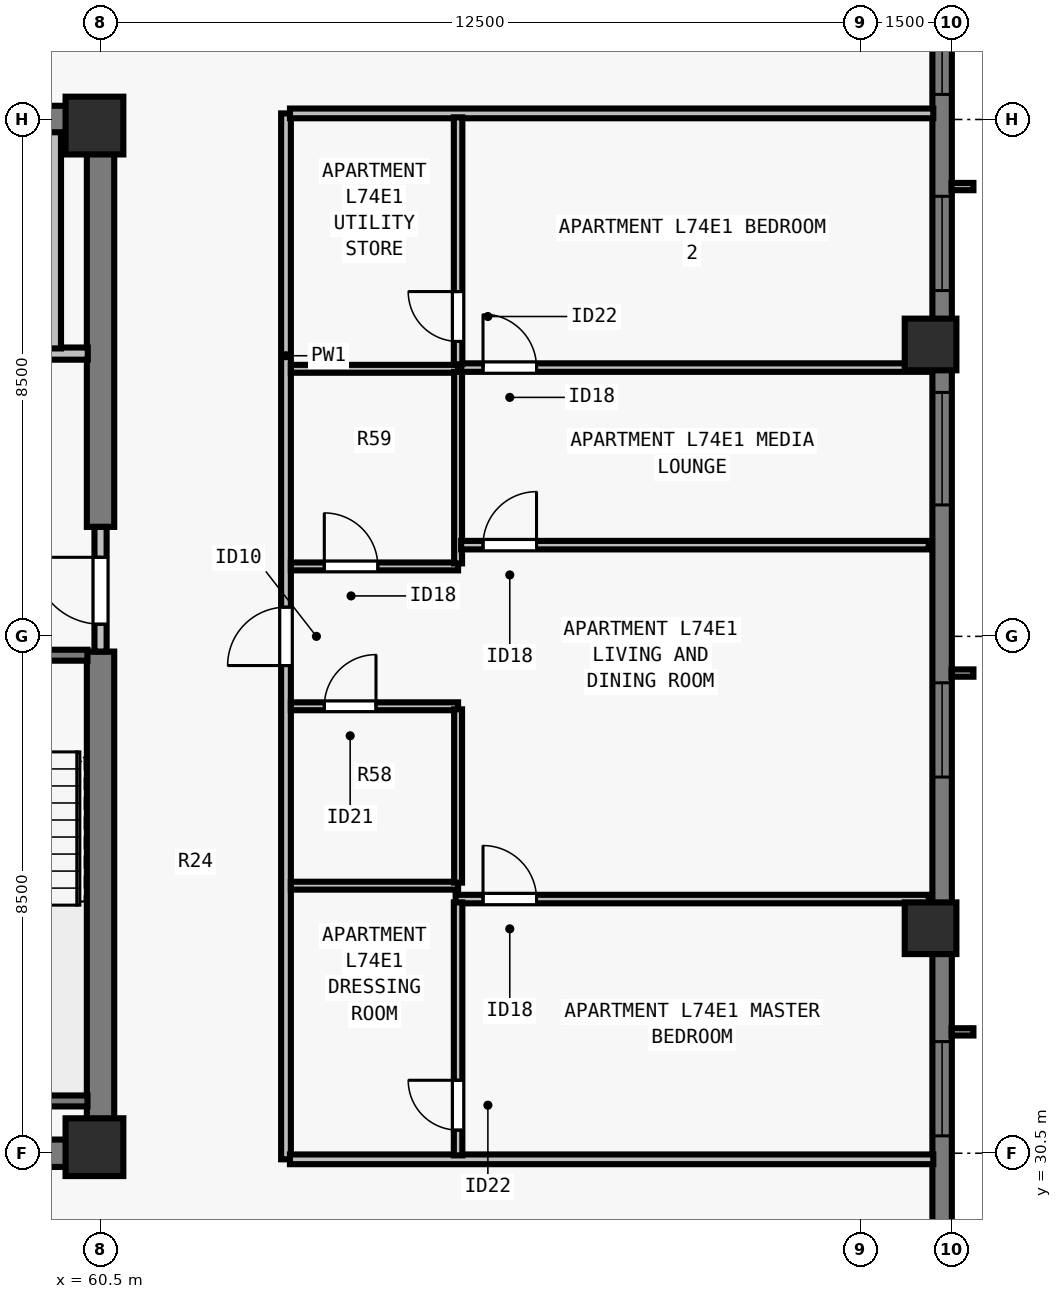
"""IFC4 building model, lengths in metres.
Left out: names, types, materials, properties, quantities, classifications, styles, units other than length and angle.
Written with IfcOpenShell. Run it as: python <this file> out.ifc"""

import sys

from ifc_helpers import new_model, si_unit, direction, frame, frame_2d, origin, origin_2d, place, context, subcontext, project, spatial, rectangle, extrude, element, fill, save


model = new_model("IFC4")
c1 = context("Model", 3, precision=1e-05, world=origin(), true_north=direction((0.0, 1.0)))
c2 = subcontext(c1, "Body", "Model", "MODEL_VIEW")
j1 = project(units=[si_unit("LENGTHUNIT", "METRE"), si_unit("PLANEANGLEUNIT", "RADIAN")], contexts=[c1])
p1 = place(None, origin())
s1 = spatial("IfcSite", under=j1, at=p1, CompositionType="ELEMENT")
p2 = place(p1, origin())
s2 = spatial("IfcBuilding", under=s1, at=p2, CompositionType="ELEMENT")
p3 = place(p2, frame((0.0, 0.0, 269.0)))
s3 = spatial("IfcBuildingStorey", under=s2, at=p3, CompositionType="ELEMENT", Elevation=269.0)
for number, where, z_axis, x_axis in (
    (1, (60.4, 30.6, 0.0), (0.0, 0.0, 1.0), (1.0, 0.0, 0.0)),
    (2, (60.4, 47.4, 0.0), (0.0, 0.0, 1.0), (1.0, 0.0, 0.0)),
):
    element("IfcColumn", number, at=place(p3, frame(where, z_axis=z_axis, x_axis=x_axis)), inside=s3, PredefinedType="COLUMN", context=c2, shape_type="SweptSolid", body=[
        extrude(rectangle(XDim=0.95, YDim=0.95, at=origin_2d()), origin(), (0.0, 0.0, 1.0), 3.5),
    ])
for number, where, z_axis, x_axis in (
    (3, (74.15, 34.2, 0.0), (0.0, 0.0, 1.0), (0.0, 1.0, 0.0)),
    (4, (74.15, 43.8, 0.0), (0.0, 0.0, 1.0), (0.0, 1.0, 0.0)),
):
    element("IfcColumn", number, at=place(p3, frame(where, z_axis=z_axis, x_axis=x_axis)), inside=s3, PredefinedType="COLUMN", context=c2, shape_type="SweptSolid", body=[
        extrude(rectangle(XDim=0.85, YDim=0.85, at=origin_2d()), origin(), (0.0, 0.0, 1.0), 3.5),
    ])
p4 = place(p3, frame((74.34, 56.5, 0.0), z_axis=(0.0, 0.0, 1.0), x_axis=(0.0, -1.0, 0.0)))
e5 = element("IfcWall", 5, at=p4, inside=s3, PredefinedType="SOLIDWALL", context=c2, shape_type="SweptSolid", body=[
    extrude(rectangle(XDim=34.702, YDim=0.32, at=frame_2d((17.351, 0.0))), origin(), (0.0, 0.0, 1.0), 3.29),
])
p5 = place(p4, frame((6.738, 0.0, 0.8)))
e6 = element("IfcOpeningElement", 6, at=p5, cuts=e5, PredefinedType="OPENING", context=c2, shape_type="SweptSolid", body=[
    extrude(rectangle(XDim=1.85, YDim=1.678, at=frame_2d((0.925, 0.839))), frame((0.0, 0.17, 0.0), z_axis=(0.0, -1.0, 0.0), x_axis=(1.0, 0.0, 0.0)), (0.0, 0.0, 1.0), 0.34),
])
p6 = place(p4, frame((10.263, 0.0, 0.8)))
e7 = element("IfcOpeningElement", 7, at=p6, cuts=e5, PredefinedType="OPENING", context=c2, shape_type="SweptSolid", body=[
    extrude(rectangle(XDim=1.55, YDim=1.678, at=frame_2d((0.775, 0.839))), frame((0.0, 0.17, 0.0), z_axis=(0.0, -1.0, 0.0), x_axis=(1.0, 0.0, 0.0)), (0.0, 0.0, 1.0), 0.34),
])
p7 = place(p4, frame((13.488, 0.0, 0.8)))
e8 = element("IfcOpeningElement", 8, at=p7, cuts=e5, PredefinedType="OPENING", context=c2, shape_type="SweptSolid", body=[
    extrude(rectangle(XDim=1.85, YDim=1.678, at=frame_2d((0.925, 0.839))), frame((0.0, 0.17, 0.0), z_axis=(0.0, -1.0, 0.0), x_axis=(1.0, 0.0, 0.0)), (0.0, 0.0, 1.0), 0.34),
])
p8 = place(p4, frame((18.264, 0.0, 0.8)))
e9 = element("IfcOpeningElement", 9, at=p8, cuts=e5, PredefinedType="OPENING", context=c2, shape_type="SweptSolid", body=[
    extrude(rectangle(XDim=1.55, YDim=1.678, at=frame_2d((0.775, 0.839))), frame((0.0, 0.17, 0.0), z_axis=(0.0, -1.0, 0.0), x_axis=(1.0, 0.0, 0.0)), (0.0, 0.0, 1.0), 0.34),
])
p9 = place(p4, frame((24.164, 0.0, 0.8)))
e10 = element("IfcOpeningElement", 10, at=p9, cuts=e5, PredefinedType="OPENING", context=c2, shape_type="SweptSolid", body=[
    extrude(rectangle(XDim=1.55, YDim=1.678, at=frame_2d((0.775, 0.839))), frame((0.0, 0.17, 0.0), z_axis=(0.0, -1.0, 0.0), x_axis=(1.0, 0.0, 0.0)), (0.0, 0.0, 1.0), 0.34),
])
for number, where, z_axis, x_axis in (
    (11, (43.275, 30.5, 0.0), (0.0, 0.0, 1.0), (1.0, 0.0, 0.0)),
    (12, (43.275, 47.5, 0.0), (0.0, 0.0, 1.0), (1.0, 0.0, 0.0)),
):
    element("IfcWall", number, at=place(p3, frame(where, z_axis=z_axis, x_axis=x_axis)), inside=s3, PredefinedType="SHEAR", context=c2, shape_type="SweptSolid", body=[
        extrude(rectangle(XDim=17.45, YDim=0.45, at=frame_2d((8.725, 0.0))), origin(), (0.0, 0.0, 1.0), 3.29),
    ])
p10 = place(p3, frame((60.5, 30.715, 0.0), z_axis=(0.0, 0.0, 1.0), x_axis=(0.0, 1.0, 0.0)))
e13 = element("IfcWall", 13, at=p10, inside=s3, PredefinedType="SHEAR", context=c2, shape_type="SweptSolid", body=[
    extrude(rectangle(XDim=8.035, YDim=0.45, at=frame_2d((4.018, 0.0))), origin(), (0.0, 0.0, 1.0), 3.29),
])
p11 = place(p3, frame((60.5, 40.8, 0.0), z_axis=(0.0, 0.0, 1.0), x_axis=(0.0, 1.0, 0.0)))
e14 = element("IfcWall", 14, at=p11, inside=s3, PredefinedType="SHEAR", context=c2, shape_type="SweptSolid", body=[
    extrude(rectangle(XDim=6.485, YDim=0.45, at=frame_2d((3.242, 0.0))), origin(), (0.0, 0.0, 1.0), 3.29),
])
p12 = place(p3, frame((60.5, 38.75, 0.0), z_axis=(0.0, 0.0, 1.0), x_axis=(0.0, 1.0, 0.0)))
e15 = element("IfcWall", 15, at=p12, inside=s3, PredefinedType="SOLIDWALL", context=c2, shape_type="SweptSolid", body=[
    extrude(rectangle(XDim=2.05, YDim=0.2, at=frame_2d((1.025, 0.0))), origin(), (0.0, 0.0, 1.0), 3.29),
])
p13 = place(p12, frame((0.45, 0.0, 0.0)))
e16 = element("IfcOpeningElement", 16, at=p13, cuts=e15, PredefinedType="OPENING", context=c2, shape_type="SweptSolid", body=[
    extrude(rectangle(XDim=1.1, YDim=2.15, at=frame_2d((0.55, 1.075))), frame((0.0, 0.11, 0.0), z_axis=(0.0, -1.0, 0.0), x_axis=(1.0, 0.0, 0.0)), (0.0, 0.0, 1.0), 0.22),
])
p14 = place(p3, frame((56.735, 43.65, 0.0), z_axis=(0.0, 0.0, 1.0), x_axis=(1.0, 0.0, 0.0)))
e17 = element("IfcWall", 17, at=p14, inside=s3, PredefinedType="SOLIDWALL", context=c2, shape_type="SweptSolid", body=[
    extrude(rectangle(XDim=3.555, YDim=0.2, at=frame_2d((1.777, 0.0))), origin(), (0.0, 0.0, 1.0), 3.29),
])
p15 = place(p14, frame((1.295, 0.0, 0.0)))
e18 = element("IfcOpeningElement", 18, at=p15, cuts=e17, PredefinedType="OPENING", context=c2, shape_type="SweptSolid", body=[
    extrude(rectangle(XDim=1.1, YDim=2.2, at=frame_2d((0.55, 1.1))), frame((0.0, 0.11, 0.0), z_axis=(0.0, -1.0, 0.0), x_axis=(1.0, 0.0, 0.0)), (0.0, 0.0, 1.0), 0.22),
])
p16 = place(p3, frame((59.75, 43.735, 0.0), z_axis=(0.0, 0.0, 1.0), x_axis=(0.0, 1.0, 0.0)))
e19 = element("IfcWall", 19, at=p16, inside=s3, PredefinedType="SOLIDWALL", context=c2, shape_type="SweptSolid", body=[
    extrude(rectangle(XDim=3.555, YDim=0.2, at=frame_2d((1.777, 0.0))), origin(), (0.0, 0.0, 1.0), 3.29),
])
p17 = place(p3, frame((63.55, 30.4, 0.0), z_axis=(0.0, 0.0, 1.0), x_axis=(0.0, 1.0, 0.0)))
e20 = element("IfcWall", 20, at=p17, inside=s3, PredefinedType="PARTITIONING", context=c2, shape_type="SweptSolid", body=[
    extrude(rectangle(XDim=17.2, YDim=0.16, at=frame_2d((8.6, 0.0))), origin(), (0.0, 0.0, 1.0), 3.29),
])
p18 = place(p17, frame((8.12, 0.0, 0.0)))
e21 = element("IfcOpeningElement", 21, at=p18, cuts=e20, PredefinedType="OPENING", context=c2, shape_type="SweptSolid", body=[
    extrude(rectangle(XDim=0.96, YDim=2.18, at=frame_2d((0.48, 1.09))), frame((0.0, 0.09, 0.0), z_axis=(0.0, -1.0, 0.0), x_axis=(1.0, 0.0, 0.0)), (0.0, 0.0, 1.0), 0.18),
])
for number, where, z_axis, x_axis in (
    (22, (63.615, 30.4, 0.0), (0.0, 0.0, 1.0), (1.0, 0.0, 0.0)),
    (23, (63.615, 47.6, 0.0), (0.0, 0.0, 1.0), (1.0, 0.0, 0.0)),
):
    element("IfcWall", number, at=place(p3, frame(where, z_axis=z_axis, x_axis=x_axis)), inside=s3, PredefinedType="PARTITIONING", context=c2, shape_type="SweptSolid", body=[
        extrude(rectangle(XDim=10.58, YDim=0.16, at=frame_2d((5.29, 0.0))), origin(), (0.0, 0.0, 1.0), 3.29),
    ])
p19 = place(p3, frame((63.63, 34.9, 0.0), z_axis=(0.0, 0.0, 1.0), x_axis=(1.0, 0.0, 0.0)))
e24 = element("IfcWall", 24, at=p19, inside=s3, PredefinedType="PLUMBINGWALL", context=c2, shape_type="SweptSolid", body=[
    extrude(rectangle(XDim=2.75, YDim=0.13, at=frame_2d((1.375, 0.0))), origin(), (0.0, 0.0, 1.0), 3.29),
])
p20 = place(p3, frame((63.63, 37.85, 0.0), z_axis=(0.0, 0.0, 1.0), x_axis=(1.0, 0.0, 0.0)))
e25 = element("IfcWall", 25, at=p20, inside=s3, PredefinedType="PLUMBINGWALL", context=c2, shape_type="SweptSolid", body=[
    extrude(rectangle(XDim=2.75, YDim=0.13, at=frame_2d((1.375, 0.0))), origin(), (0.0, 0.0, 1.0), 3.29),
])
p21 = place(p20, frame((0.55, 0.0, 0.0)))
e26 = element("IfcOpeningElement", 26, at=p21, cuts=e25, PredefinedType="OPENING", context=c2, shape_type="SweptSolid", body=[
    extrude(rectangle(XDim=0.85, YDim=2.08, at=frame_2d((0.425, 1.04))), frame((0.0, 0.075, 0.0), z_axis=(0.0, -1.0, 0.0), x_axis=(1.0, 0.0, 0.0)), (0.0, 0.0, 1.0), 0.15),
])
p22 = place(p3, frame((66.38, 34.95, 0.0), z_axis=(0.0, 0.0, 1.0), x_axis=(0.0, 1.0, 0.0)))
e27 = element("IfcWall", 27, at=p22, inside=s3, PredefinedType="PLUMBINGWALL", context=c2, shape_type="SweptSolid", body=[
    extrude(rectangle(XDim=2.85, YDim=0.13, at=frame_2d((1.425, 0.0))), origin(), (0.0, 0.0, 1.0), 3.29),
])
p23 = place(p3, frame((63.63, 43.4, 0.0), z_axis=(0.0, 0.0, 1.0), x_axis=(1.0, 0.0, 0.0)))
e28 = element("IfcWall", 28, at=p23, inside=s3, PredefinedType="PLUMBINGWALL", context=c2, shape_type="SweptSolid", body=[
    extrude(rectangle(XDim=2.75, YDim=0.13, at=frame_2d((1.375, 0.0))), origin(), (0.0, 0.0, 1.0), 3.29),
])
p24 = place(p3, frame((63.63, 40.15, 0.0), z_axis=(0.0, 0.0, 1.0), x_axis=(1.0, 0.0, 0.0)))
e29 = element("IfcWall", 29, at=p24, inside=s3, PredefinedType="PLUMBINGWALL", context=c2, shape_type="SweptSolid", body=[
    extrude(rectangle(XDim=2.75, YDim=0.13, at=frame_2d((1.375, 0.0))), origin(), (0.0, 0.0, 1.0), 3.29),
])
p25 = place(p24, frame((0.55, 0.0, 0.0)))
e30 = element("IfcOpeningElement", 30, at=p25, cuts=e29, PredefinedType="OPENING", context=c2, shape_type="SweptSolid", body=[
    extrude(rectangle(XDim=0.88, YDim=2.1, at=frame_2d((0.44, 1.05))), frame((0.0, 0.075, 0.0), z_axis=(0.0, -1.0, 0.0), x_axis=(1.0, 0.0, 0.0)), (0.0, 0.0, 1.0), 0.15),
])
p26 = place(p3, frame((66.38, 40.2, 0.0), z_axis=(0.0, 0.0, 1.0), x_axis=(0.0, 1.0, 0.0)))
e31 = element("IfcWall", 31, at=p26, inside=s3, PredefinedType="PLUMBINGWALL", context=c2, shape_type="SweptSolid", body=[
    extrude(rectangle(XDim=3.15, YDim=0.13, at=frame_2d((1.575, 0.0))), origin(), (0.0, 0.0, 1.0), 3.29),
])
p27 = place(p3, frame((66.34, 34.68, 0.0), z_axis=(0.0, 0.0, 1.0), x_axis=(1.0, 0.0, 0.0)))
e32 = element("IfcWall", 32, at=p27, inside=s3, PredefinedType="PARTITIONING", context=c2, shape_type="SweptSolid", body=[
    extrude(rectangle(XDim=7.78, YDim=0.14, at=frame_2d((3.89, 0.0))), origin(), (0.0, 0.0, 1.0), 3.29),
])
p28 = place(p27, frame((0.45, 0.0, 0.0)))
e33 = element("IfcOpeningElement", 33, at=p28, cuts=e32, PredefinedType="OPENING", context=c2, shape_type="SweptSolid", body=[
    extrude(rectangle(XDim=0.88, YDim=2.1, at=frame_2d((0.44, 1.05))), frame((0.0, 0.08, 0.0), z_axis=(0.0, -1.0, 0.0), x_axis=(1.0, 0.0, 0.0)), (0.0, 0.0, 1.0), 0.16),
])
p29 = place(p3, frame((66.38, 30.465, 0.0), z_axis=(0.0, 0.0, 1.0), x_axis=(0.0, 1.0, 0.0)))
e34 = element("IfcWall", 34, at=p29, inside=s3, PredefinedType="PARTITIONING", context=c2, shape_type="SweptSolid", body=[
    extrude(rectangle(XDim=4.16, YDim=0.14, at=frame_2d((2.08, 0.0))), origin(), (0.0, 0.0, 1.0), 3.29),
])
p30 = place(p29, frame((0.415, 0.0, 0.0)))
e35 = element("IfcOpeningElement", 35, at=p30, cuts=e34, PredefinedType="OPENING", context=c2, shape_type="SweptSolid", body=[
    extrude(rectangle(XDim=0.82, YDim=2.1, at=frame_2d((0.41, 1.05))), frame((0.0, 0.08, 0.0), z_axis=(0.0, -1.0, 0.0), x_axis=(1.0, 0.0, 0.0)), (0.0, 0.0, 1.0), 0.16),
])
p31 = place(p3, frame((66.43, 43.42, 0.0), z_axis=(0.0, 0.0, 1.0), x_axis=(1.0, 0.0, 0.0)))
e36 = element("IfcWall", 36, at=p31, inside=s3, PredefinedType="PARTITIONING", context=c2, shape_type="SweptSolid", body=[
    extrude(rectangle(XDim=7.69, YDim=0.14, at=frame_2d((3.845, 0.0))), origin(), (0.0, 0.0, 1.0), 3.29),
])
p32 = place(p31, frame((0.36, 0.0, 0.0)))
e37 = element("IfcOpeningElement", 37, at=p32, cuts=e36, PredefinedType="OPENING", context=c2, shape_type="SweptSolid", body=[
    extrude(rectangle(XDim=0.88, YDim=2.1, at=frame_2d((0.44, 1.05))), frame((0.0, 0.08, 0.0), z_axis=(0.0, -1.0, 0.0), x_axis=(1.0, 0.0, 0.0)), (0.0, 0.0, 1.0), 0.16),
])
p33 = place(p3, frame((66.38, 43.475, 0.0), z_axis=(0.0, 0.0, 1.0), x_axis=(0.0, 1.0, 0.0)))
e38 = element("IfcWall", 38, at=p33, inside=s3, PredefinedType="PARTITIONING", context=c2, shape_type="SweptSolid", body=[
    extrude(rectangle(XDim=4.06, YDim=0.14, at=frame_2d((2.03, 0.0))), origin(), (0.0, 0.0, 1.0), 3.29),
])
p34 = place(p33, frame((0.375, 0.0, 0.0)))
e39 = element("IfcOpeningElement", 39, at=p34, cuts=e38, PredefinedType="OPENING", context=c2, shape_type="SweptSolid", body=[
    extrude(rectangle(XDim=0.82, YDim=2.1, at=frame_2d((0.41, 1.05))), frame((0.0, 0.08, 0.0), z_axis=(0.0, -1.0, 0.0), x_axis=(1.0, 0.0, 0.0)), (0.0, 0.0, 1.0), 0.16),
])
p35 = place(p3, frame((66.43, 40.5, 0.0), z_axis=(0.0, 0.0, 1.0), x_axis=(1.0, 0.0, 0.0)))
e40 = element("IfcWall", 40, at=p35, inside=s3, PredefinedType="PARTITIONING", context=c2, shape_type="SweptSolid", body=[
    extrude(rectangle(XDim=7.69, YDim=0.14, at=frame_2d((3.845, 0.0))), origin(), (0.0, 0.0, 1.0), 3.29),
])
p36 = place(p35, frame((0.36, 0.0, 0.0)))
e41 = element("IfcOpeningElement", 41, at=p36, cuts=e40, PredefinedType="OPENING", context=c2, shape_type="SweptSolid", body=[
    extrude(rectangle(XDim=0.88, YDim=2.1, at=frame_2d((0.44, 1.05))), frame((0.0, 0.08, 0.0), z_axis=(0.0, -1.0, 0.0), x_axis=(1.0, 0.0, 0.0)), (0.0, 0.0, 1.0), 0.16),
])
p37 = place(p3, frame((57.005, 38.69, 0.0), z_axis=(0.0, 0.0, 1.0), x_axis=(1.0, 0.0, 0.0)))
e42 = element("IfcWall", 42, at=p37, inside=s3, PredefinedType="SOLIDWALL", context=c2, shape_type="SweptSolid", body=[
    extrude(rectangle(XDim=3.28, YDim=0.18, at=frame_2d((1.64, 0.0))), origin(), (0.0, 0.0, 1.0), 3.29),
])
p38 = place(p37, frame((1.165, 0.0, 0.0)))
e43 = element("IfcOpeningElement", 43, at=p38, cuts=e42, PredefinedType="OPENING", context=c2, shape_type="SweptSolid", body=[
    extrude(rectangle(XDim=0.95, YDim=2.15, at=frame_2d((0.475, 1.075))), frame((0.0, 0.1, 0.0), z_axis=(0.0, -1.0, 0.0), x_axis=(1.0, 0.0, 0.0)), (0.0, 0.0, 1.0), 0.2),
])
p39 = place(p3, frame((57.005, 31.36, 0.0), z_axis=(0.0, 0.0, 1.0), x_axis=(1.0, 0.0, 0.0)))
e44 = element("IfcWall", 44, at=p39, inside=s3, PredefinedType="SOLIDWALL", context=c2, shape_type="SweptSolid", body=[
    extrude(rectangle(XDim=3.28, YDim=0.18, at=frame_2d((1.64, 0.0))), origin(), (0.0, 0.0, 1.0), 3.29),
])
p40 = place(p5, origin())
e45 = element("IfcWindow", 45, at=p40, inside=s3, PartitioningType="SINGLE_PANEL", PredefinedType="WINDOW", context=c2, shape_type="SweptSolid", body=[
    extrude(rectangle(XDim=1.85, YDim=1.678, at=frame_2d((0.925, 0.839))), frame((0.0, -0.05, 0.0), z_axis=(0.0, -1.0, 0.0), x_axis=(1.0, 0.0, 0.0)), (0.0, 0.0, 1.0), 0.06),
])
fill(e6, e45)
p41 = place(p6, origin())
e46 = element("IfcWindow", 46, at=p41, inside=s3, PartitioningType="SINGLE_PANEL", PredefinedType="WINDOW", context=c2, shape_type="SweptSolid", body=[
    extrude(rectangle(XDim=1.55, YDim=1.678, at=frame_2d((0.775, 0.839))), frame((0.0, -0.05, 0.0), z_axis=(0.0, -1.0, 0.0), x_axis=(1.0, 0.0, 0.0)), (0.0, 0.0, 1.0), 0.06),
])
fill(e7, e46)
p42 = place(p7, origin())
e47 = element("IfcWindow", 47, at=p42, inside=s3, PartitioningType="SINGLE_PANEL", PredefinedType="WINDOW", context=c2, shape_type="SweptSolid", body=[
    extrude(rectangle(XDim=1.85, YDim=1.678, at=frame_2d((0.925, 0.839))), frame((0.0, -0.05, 0.0), z_axis=(0.0, -1.0, 0.0), x_axis=(1.0, 0.0, 0.0)), (0.0, 0.0, 1.0), 0.06),
])
fill(e8, e47)
p43 = place(p8, origin())
e48 = element("IfcWindow", 48, at=p43, inside=s3, PartitioningType="SINGLE_PANEL", PredefinedType="WINDOW", context=c2, shape_type="SweptSolid", body=[
    extrude(rectangle(XDim=1.55, YDim=1.678, at=frame_2d((0.775, 0.839))), frame((0.0, -0.05, 0.0), z_axis=(0.0, -1.0, 0.0), x_axis=(1.0, 0.0, 0.0)), (0.0, 0.0, 1.0), 0.06),
])
fill(e9, e48)
p44 = place(p9, origin())
e49 = element("IfcWindow", 49, at=p44, inside=s3, PartitioningType="SINGLE_PANEL", PredefinedType="WINDOW", context=c2, shape_type="SweptSolid", body=[
    extrude(rectangle(XDim=1.55, YDim=1.678, at=frame_2d((0.775, 0.839))), frame((0.0, -0.05, 0.0), z_axis=(0.0, -1.0, 0.0), x_axis=(1.0, 0.0, 0.0)), (0.0, 0.0, 1.0), 0.06),
])
fill(e10, e49)
p45 = place(p13, origin())
e50 = element("IfcDoor", 50, at=p45, inside=s3, OperationType="SINGLE_SWING_RIGHT", PredefinedType="DOOR", context=c2, shape_type="SweptSolid", body=[
    extrude(rectangle(XDim=1.1, YDim=2.15, at=frame_2d((0.55, 1.075))), frame((0.0, 0.025, 0.0), z_axis=(0.0, -1.0, 0.0), x_axis=(1.0, 0.0, 0.0)), (0.0, 0.0, 1.0), 0.05),
])
fill(e16, e50)
p46 = place(p21, origin())
e51 = element("IfcDoor", 51, at=p46, inside=s3, OperationType="SINGLE_SWING_RIGHT", PredefinedType="DOOR", context=c2, shape_type="SweptSolid", body=[
    extrude(rectangle(XDim=0.85, YDim=2.08, at=frame_2d((0.425, 1.04))), frame((0.0, 0.025, 0.0), z_axis=(0.0, -1.0, 0.0), x_axis=(1.0, 0.0, 0.0)), (0.0, 0.0, 1.0), 0.05),
])
fill(e26, e51)
p47 = place(p25, origin())
e52 = element("IfcDoor", 52, at=p47, inside=s3, OperationType="SINGLE_SWING_LEFT", PredefinedType="DOOR", context=c2, shape_type="SweptSolid", body=[
    extrude(rectangle(XDim=0.88, YDim=2.1, at=frame_2d((0.44, 1.05))), frame((0.0, 0.025, 0.0), z_axis=(0.0, -1.0, 0.0), x_axis=(1.0, 0.0, 0.0)), (0.0, 0.0, 1.0), 0.05),
])
fill(e30, e52)
p48 = place(p30, origin())
e53 = element("IfcDoor", 53, at=p48, inside=s3, OperationType="SINGLE_SWING_RIGHT", PredefinedType="DOOR", context=c2, shape_type="SweptSolid", body=[
    extrude(rectangle(XDim=0.82, YDim=2.1, at=frame_2d((0.41, 1.05))), frame((0.0, 0.025, 0.0), z_axis=(0.0, -1.0, 0.0), x_axis=(1.0, 0.0, 0.0)), (0.0, 0.0, 1.0), 0.05),
])
fill(e35, e53)
p49 = place(p28, origin())
e54 = element("IfcDoor", 54, at=p49, inside=s3, OperationType="SINGLE_SWING_LEFT", PredefinedType="DOOR", context=c2, shape_type="SweptSolid", body=[
    extrude(rectangle(XDim=0.88, YDim=2.1, at=frame_2d((0.44, 1.05))), frame((0.0, 0.025, 0.0), z_axis=(0.0, -1.0, 0.0), x_axis=(1.0, 0.0, 0.0)), (0.0, 0.0, 1.0), 0.05),
])
fill(e33, e54)
p50 = place(p34, origin())
e55 = element("IfcDoor", 55, at=p50, inside=s3, OperationType="SINGLE_SWING_RIGHT", PredefinedType="DOOR", context=c2, shape_type="SweptSolid", body=[
    extrude(rectangle(XDim=0.82, YDim=2.1, at=frame_2d((0.41, 1.05))), frame((0.0, 0.025, 0.0), z_axis=(0.0, -1.0, 0.0), x_axis=(1.0, 0.0, 0.0)), (0.0, 0.0, 1.0), 0.05),
])
fill(e39, e55)
p51 = place(p32, origin())
e56 = element("IfcDoor", 56, at=p51, inside=s3, OperationType="SINGLE_SWING_LEFT", PredefinedType="DOOR", context=c2, shape_type="SweptSolid", body=[
    extrude(rectangle(XDim=0.88, YDim=2.1, at=frame_2d((0.44, 1.05))), frame((0.0, 0.025, 0.0), z_axis=(0.0, -1.0, 0.0), x_axis=(1.0, 0.0, 0.0)), (0.0, 0.0, 1.0), 0.05),
])
fill(e37, e56)
p52 = place(p36, origin())
e57 = element("IfcDoor", 57, at=p52, inside=s3, OperationType="SINGLE_SWING_RIGHT", PredefinedType="DOOR", context=c2, shape_type="SweptSolid", body=[
    extrude(rectangle(XDim=0.88, YDim=2.1, at=frame_2d((0.44, 1.05))), frame((0.0, 0.025, 0.0), z_axis=(0.0, -1.0, 0.0), x_axis=(1.0, 0.0, 0.0)), (0.0, 0.0, 1.0), 0.05),
])
fill(e41, e57)
p53 = place(p18, origin())
e58 = element("IfcDoor", 58, at=p53, inside=s3, OperationType="SINGLE_SWING_LEFT", PredefinedType="DOOR", context=c2, shape_type="SweptSolid", body=[
    extrude(rectangle(XDim=0.96, YDim=2.18, at=frame_2d((0.48, 1.09))), frame((0.0, 0.025, 0.0), z_axis=(0.0, -1.0, 0.0), x_axis=(1.0, 0.0, 0.0)), (0.0, 0.0, 1.0), 0.05),
])
fill(e21, e58)
save(model, sys.argv[1])
